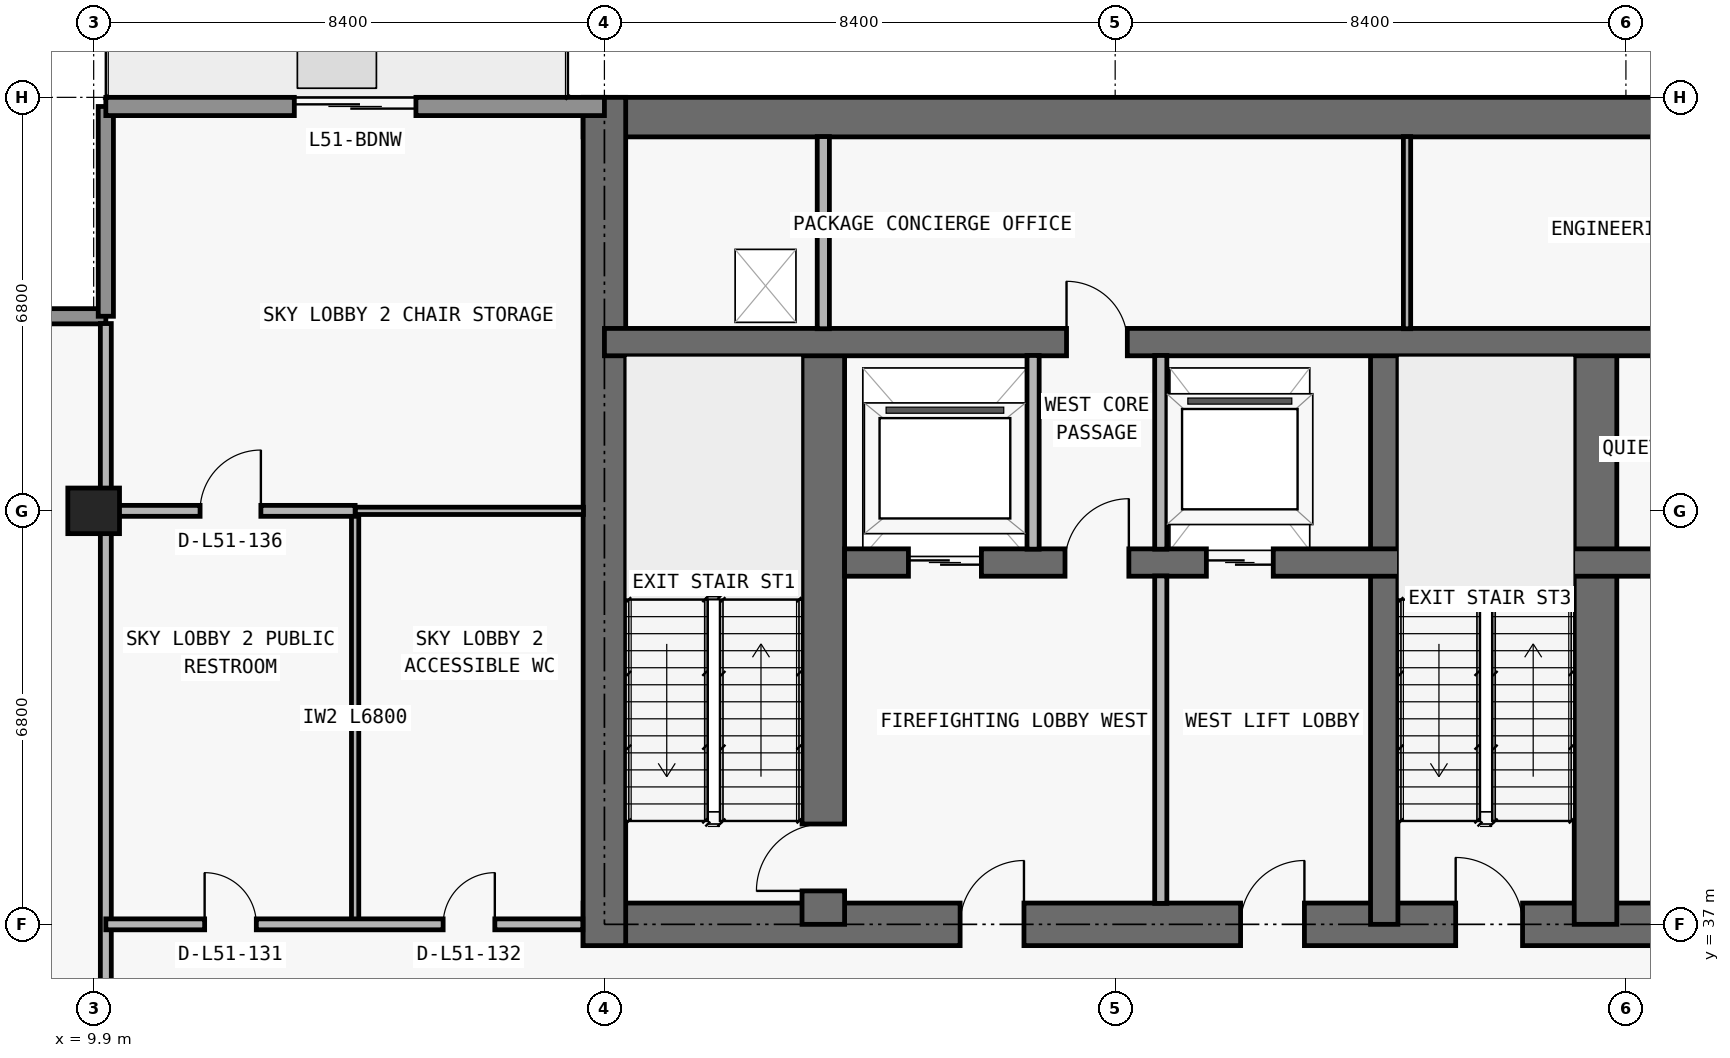
"""IFC4 building model, lengths in metres.
Left out: names, types, materials, properties, quantities, classifications, styles, units other than length and angle.
Written with IfcOpenShell. Run it as: python <this file> out.ifc"""

import sys

from ifc_helpers import new_model, si_unit, direction, frame, frame_2d, origin, origin_2d, place, context, subcontext, project, spatial, rectangle, extrude, element, fill, save


model = new_model("IFC4")
c1 = context("Model", 3, precision=1e-05, world=origin(), true_north=direction((0.0, 1.0)))
c2 = subcontext(c1, "Body", "Model", "MODEL_VIEW")
j1 = project(units=[si_unit("LENGTHUNIT", "METRE"), si_unit("PLANEANGLEUNIT", "RADIAN")], contexts=[c1])
p1 = place(None, origin())
s1 = spatial("IfcSite", under=j1, at=p1, CompositionType="ELEMENT")
p2 = place(p1, origin())
s2 = spatial("IfcBuilding", under=s1, at=p2, CompositionType="ELEMENT")
p3 = place(p2, frame((0.0, 0.0, 183.6)))
s3 = spatial("IfcBuildingStorey", under=s2, at=p3, CompositionType="ELEMENT", Elevation=183.6)
p4 = place(p3, frame((9.9, 43.8, 0.0), z_axis=(0.0, 0.0, 1.0), x_axis=(1.0, 0.0, 0.0)))
e1 = element("IfcColumn", 1, at=p4, inside=s3, PredefinedType="COLUMN", context=c2, shape_type="SweptSolid", body=[
    extrude(rectangle(XDim=0.85, YDim=0.75, at=origin_2d()), origin(), (0.0, 0.0, 1.0), 4.55),
])
p5 = place(p3, frame((17.95, 37.0, 0.0), z_axis=(0.0, 0.0, 1.0), x_axis=(1.0, 0.0, 0.0)))
e2 = element("IfcWall", 2, at=p5, inside=s3, PredefinedType="SHEAR", context=c2, shape_type="SweptSolid", body=[
    extrude(rectangle(XDim=41.9, YDim=0.7, at=frame_2d((20.95, 0.0))), origin(), (0.0, 0.0, 1.0), 4.55),
])
p6 = place(p5, frame((14.35, 0.0, 0.0)))
e3 = element("IfcOpeningElement", 3, at=p6, cuts=e2, PredefinedType="OPENING", context=c2, shape_type="SweptSolid", body=[
    extrude(rectangle(XDim=1.1, YDim=2.15, at=frame_2d((0.55, 1.075))), frame((0.0, 0.36, 0.0), z_axis=(0.0, -1.0, 0.0), x_axis=(1.0, 0.0, 0.0)), (0.0, 0.0, 1.0), 0.72),
])
p7 = place(p5, frame((6.2, 0.0, 0.0)))
e4 = element("IfcOpeningElement", 4, at=p7, cuts=e2, PredefinedType="OPENING", context=c2, shape_type="SweptSolid", body=[
    extrude(rectangle(XDim=1.05, YDim=2.15, at=frame_2d((0.525, 1.075))), frame((0.0, 0.36, 0.0), z_axis=(0.0, -1.0, 0.0), x_axis=(1.0, 0.0, 0.0)), (0.0, 0.0, 1.0), 0.72),
])
p8 = place(p5, frame((34.7, 0.0, 0.0)))
e5 = element("IfcOpeningElement", 5, at=p8, cuts=e2, PredefinedType="OPENING", context=c2, shape_type="SweptSolid", body=[
    extrude(rectangle(XDim=1.05, YDim=2.15, at=frame_2d((0.525, 1.075))), frame((0.0, 0.36, 0.0), z_axis=(0.0, -1.0, 0.0), x_axis=(1.0, 0.0, 0.0)), (0.0, 0.0, 1.0), 0.72),
])
p9 = place(p5, frame((10.812, 0.0, 0.0)))
e6 = element("IfcOpeningElement", 6, at=p9, cuts=e2, PredefinedType="OPENING", context=c2, shape_type="SweptSolid", body=[
    extrude(rectangle(XDim=1.05, YDim=2.15, at=frame_2d((0.525, 1.075))), frame((0.0, 0.36, 0.0), z_axis=(0.0, -1.0, 0.0), x_axis=(1.0, 0.0, 0.0)), (0.0, 0.0, 1.0), 0.72),
])
p10 = place(p5, frame((24.05, 0.0, 0.0)))
e7 = element("IfcOpeningElement", 7, at=p10, cuts=e2, PredefinedType="OPENING", context=c2, shape_type="SweptSolid", body=[
    extrude(rectangle(XDim=1.05, YDim=2.15, at=frame_2d((0.525, 1.075))), frame((0.0, 0.36, 0.0), z_axis=(0.0, -1.0, 0.0), x_axis=(1.0, 0.0, 0.0)), (0.0, 0.0, 1.0), 0.72),
])
p11 = place(p3, frame((17.95, 50.275, 0.0), z_axis=(0.0, 0.0, 1.0), x_axis=(1.0, 0.0, 0.0)))
e8 = element("IfcWall", 8, at=p11, inside=s3, PredefinedType="SHEAR", context=c2, shape_type="SweptSolid", body=[
    extrude(rectangle(XDim=41.9, YDim=0.65, at=frame_2d((20.95, 0.0))), origin(), (0.0, 0.0, 1.0), 4.55),
])
p12 = place(p3, frame((18.3, 36.65, 0.0), z_axis=(0.0, 0.0, 1.0), x_axis=(0.0, 1.0, 0.0)))
e9 = element("IfcWall", 9, at=p12, inside=s3, PredefinedType="SHEAR", context=c2, shape_type="SweptSolid", body=[
    extrude(rectangle(XDim=13.95, YDim=0.7, at=frame_2d((6.975, 0.0))), origin(), (0.0, 0.0, 1.0), 4.55),
])
p13 = place(p3, frame((21.9, 37.0, 0.0), z_axis=(0.0, 0.0, 1.0), x_axis=(0.0, 1.0, 0.0)))
e10 = element("IfcWall", 10, at=p13, inside=s3, PredefinedType="SHEAR", context=c2, shape_type="SweptSolid", body=[
    extrude(rectangle(XDim=9.575, YDim=0.7, at=frame_2d((4.788, 0.0))), origin(), (0.0, 0.0, 1.0), 4.55),
])
p14 = place(p13, frame((0.55, 0.0, 0.0)))
e11 = element("IfcOpeningElement", 11, at=p14, cuts=e10, PredefinedType="OPENING", context=c2, shape_type="SweptSolid", body=[
    extrude(rectangle(XDim=1.1, YDim=2.15, at=frame_2d((0.55, 1.075))), frame((0.0, 0.36, 0.0), z_axis=(0.0, -1.0, 0.0), x_axis=(1.0, 0.0, 0.0)), (0.0, 0.0, 1.0), 0.72),
])
p15 = place(p3, frame((31.125, 37.0, 0.0), z_axis=(0.0, 0.0, 1.0), x_axis=(0.0, 1.0, 0.0)))
e12 = element("IfcWall", 12, at=p15, inside=s3, PredefinedType="SHEAR", context=c2, shape_type="SweptSolid", body=[
    extrude(rectangle(XDim=9.575, YDim=0.45, at=frame_2d((4.788, 0.0))), origin(), (0.0, 0.0, 1.0), 4.55),
])
p16 = place(p3, frame((34.6, 37.0, 0.0), z_axis=(0.0, 0.0, 1.0), x_axis=(0.0, 1.0, 0.0)))
e13 = element("IfcWall", 13, at=p16, inside=s3, PredefinedType="SHEAR", context=c2, shape_type="SweptSolid", body=[
    extrude(rectangle(XDim=9.575, YDim=0.7, at=frame_2d((4.788, 0.0))), origin(), (0.0, 0.0, 1.0), 4.55),
])
p17 = place(p3, frame((22.25, 42.95, 0.0), z_axis=(0.0, 0.0, 1.0), x_axis=(1.0, 0.0, 0.0)))
e14 = element("IfcWall", 14, at=p17, inside=s3, PredefinedType="SHEAR", context=c2, shape_type="SweptSolid", body=[
    extrude(rectangle(XDim=33.3, YDim=0.45, at=frame_2d((16.65, 0.0))), origin(), (0.0, 0.0, 1.0), 4.55),
])
p18 = place(p17, frame((1.05, 0.0, 0.0)))
e15 = element("IfcOpeningElement", 15, at=p18, cuts=e14, PredefinedType="OPENING", context=c2, shape_type="SweptSolid", body=[
    extrude(rectangle(XDim=1.2, YDim=2.2, at=frame_2d((0.6, 1.1))), frame((0.0, 0.235, 0.0), z_axis=(0.0, -1.0, 0.0), x_axis=(1.0, 0.0, 0.0)), (0.0, 0.0, 1.0), 0.47),
])
p19 = place(p17, frame((31.05, 0.0, 0.0)))
e16 = element("IfcOpeningElement", 16, at=p19, cuts=e14, PredefinedType="OPENING", context=c2, shape_type="SweptSolid", body=[
    extrude(rectangle(XDim=1.2, YDim=2.2, at=frame_2d((0.6, 1.1))), frame((0.0, 0.235, 0.0), z_axis=(0.0, -1.0, 0.0), x_axis=(1.0, 0.0, 0.0)), (0.0, 0.0, 1.0), 0.47),
])
p20 = place(p17, frame((21.4, 0.0, 0.0)))
e17 = element("IfcOpeningElement", 17, at=p20, cuts=e14, PredefinedType="OPENING", context=c2, shape_type="SweptSolid", body=[
    extrude(rectangle(XDim=1.1, YDim=2.2, at=frame_2d((0.55, 1.1))), frame((0.0, 0.235, 0.0), z_axis=(0.0, -1.0, 0.0), x_axis=(1.0, 0.0, 0.0)), (0.0, 0.0, 1.0), 0.47),
])
p21 = place(p17, frame((24.0, 0.0, 0.0)))
e18 = element("IfcOpeningElement", 18, at=p21, cuts=e14, PredefinedType="OPENING", context=c2, shape_type="SweptSolid", body=[
    extrude(rectangle(XDim=1.1, YDim=2.2, at=frame_2d((0.55, 1.1))), frame((0.0, 0.235, 0.0), z_axis=(0.0, -1.0, 0.0), x_axis=(1.0, 0.0, 0.0)), (0.0, 0.0, 1.0), 0.47),
])
p22 = place(p17, frame((26.45, 0.0, 0.0)))
e19 = element("IfcOpeningElement", 19, at=p22, cuts=e14, PredefinedType="OPENING", context=c2, shape_type="SweptSolid", body=[
    extrude(rectangle(XDim=1.1, YDim=2.2, at=frame_2d((0.55, 1.1))), frame((0.0, 0.235, 0.0), z_axis=(0.0, -1.0, 0.0), x_axis=(1.0, 0.0, 0.0)), (0.0, 0.0, 1.0), 0.47),
])
p23 = place(p17, frame((5.95, 0.0, 0.0)))
e20 = element("IfcOpeningElement", 20, at=p23, cuts=e14, PredefinedType="OPENING", context=c2, shape_type="SweptSolid", body=[
    extrude(rectangle(XDim=1.1, YDim=2.2, at=frame_2d((0.55, 1.1))), frame((0.0, 0.235, 0.0), z_axis=(0.0, -1.0, 0.0), x_axis=(1.0, 0.0, 0.0)), (0.0, 0.0, 1.0), 0.47),
])
p24 = place(p17, frame((3.625, 0.0, 0.0)))
e21 = element("IfcOpeningElement", 21, at=p24, cuts=e14, PredefinedType="OPENING", context=c2, shape_type="SweptSolid", body=[
    extrude(rectangle(XDim=1.05, YDim=2.15, at=frame_2d((0.525, 1.075))), frame((0.0, 0.235, 0.0), z_axis=(0.0, -1.0, 0.0), x_axis=(1.0, 0.0, 0.0)), (0.0, 0.0, 1.0), 0.47),
])
p25 = place(p17, frame((28.675, 0.0, 0.0)))
e22 = element("IfcOpeningElement", 22, at=p25, cuts=e14, PredefinedType="OPENING", context=c2, shape_type="SweptSolid", body=[
    extrude(rectangle(XDim=1.05, YDim=2.15, at=frame_2d((0.525, 1.075))), frame((0.0, 0.235, 0.0), z_axis=(0.0, -1.0, 0.0), x_axis=(1.0, 0.0, 0.0)), (0.0, 0.0, 1.0), 0.47),
])
p26 = place(p17, frame((15.975, 0.0, 0.0)))
e23 = element("IfcOpeningElement", 23, at=p26, cuts=e14, PredefinedType="OPENING", context=c2, shape_type="SweptSolid", body=[
    extrude(rectangle(XDim=1.0, YDim=2.2, at=frame_2d((0.5, 1.1))), frame((0.0, 0.235, 0.0), z_axis=(0.0, -1.0, 0.0), x_axis=(1.0, 0.0, 0.0)), (0.0, 0.0, 1.0), 0.47),
])
p27 = place(p3, frame((18.3, 46.575, 0.0), z_axis=(0.0, 0.0, 1.0), x_axis=(1.0, 0.0, 0.0)))
e24 = element("IfcWall", 24, at=p27, inside=s3, PredefinedType="SHEAR", context=c2, shape_type="SweptSolid", body=[
    extrude(rectangle(XDim=41.2, YDim=0.45, at=frame_2d((20.6, 0.0))), origin(), (0.0, 0.0, 1.0), 4.55),
])
p28 = place(p27, frame((7.6, 0.0, 0.0)))
e25 = element("IfcOpeningElement", 25, at=p28, cuts=e24, PredefinedType="OPENING", context=c2, shape_type="SweptSolid", body=[
    extrude(rectangle(XDim=1.0, YDim=2.2, at=frame_2d((0.5, 1.1))), frame((0.0, 0.235, 0.0), z_axis=(0.0, -1.0, 0.0), x_axis=(1.0, 0.0, 0.0)), (0.0, 0.0, 1.0), 0.47),
])
p29 = place(p27, frame((32.625, 0.0, 0.0)))
e26 = element("IfcOpeningElement", 26, at=p29, cuts=e24, PredefinedType="OPENING", context=c2, shape_type="SweptSolid", body=[
    extrude(rectangle(XDim=1.05, YDim=2.15, at=frame_2d((0.525, 1.075))), frame((0.0, 0.235, 0.0), z_axis=(0.0, -1.0, 0.0), x_axis=(1.0, 0.0, 0.0)), (0.0, 0.0, 1.0), 0.47),
])
p30 = place(p3, frame((6.25, 47.0, 0.0), z_axis=(0.0, 0.0, 1.0), x_axis=(1.0, 0.0, 0.0)))
e27 = element("IfcWall", 27, at=p30, inside=s3, PredefinedType="ELEMENTEDWALL", context=c2, shape_type="SweptSolid", body=[
    extrude(rectangle(XDim=3.85, YDim=0.25, at=frame_2d((1.925, 0.0))), origin(), (0.0, 0.0, 1.0), 4.55),
])
p31 = place(p3, frame((10.1, 47.0, 0.0), z_axis=(0.0, 0.0, 1.0), x_axis=(0.0, 1.0, 0.0)))
e28 = element("IfcWall", 28, at=p31, inside=s3, PredefinedType="ELEMENTEDWALL", context=c2, shape_type="SweptSolid", body=[
    extrude(rectangle(XDim=3.45, YDim=0.25, at=frame_2d((1.725, 0.0))), origin(), (0.0, 0.0, 1.0), 4.55),
])
p32 = place(p3, frame((10.1, 50.45, 0.0), z_axis=(0.0, 0.0, 1.0), x_axis=(1.0, 0.0, 0.0)))
e29 = element("IfcWall", 29, at=p32, inside=s3, PredefinedType="STANDARD", context=c2, shape_type="SweptSolid", body=[
    extrude(rectangle(XDim=8.2, YDim=0.3, at=frame_2d((4.1, 0.0))), origin(), (0.0, 0.0, 1.0), 4.55),
])
p33 = place(p32, frame((3.1, 0.0, 0.0)))
e30 = element("IfcOpeningElement", 30, at=p33, cuts=e29, PredefinedType="OPENING", context=c2, shape_type="SweptSolid", body=[
    extrude(rectangle(XDim=2.0, YDim=2.3, at=frame_2d((1.0, 1.15))), frame((0.0, 0.16, 0.0), z_axis=(0.0, -1.0, 0.0), x_axis=(1.0, 0.0, 0.0)), (0.0, 0.0, 1.0), 0.32),
])
p34 = place(p3, frame((10.1, 11.285, 0.0), z_axis=(0.0, 0.0, 1.0), x_axis=(0.0, 1.0, 0.0)))
e31 = element("IfcWall", 31, at=p34, inside=s3, PredefinedType="PARTITIONING", context=c2, shape_type="SweptSolid", body=[
    extrude(rectangle(XDim=35.595, YDim=0.18, at=frame_2d((17.797, 0.0))), origin(), (0.0, 0.0, 1.0), 3.514),
])
p35 = place(p3, frame((14.2, 37.0, 0.0), z_axis=(0.0, 0.0, 1.0), x_axis=(0.0, 1.0, 0.0)))
e32 = element("IfcWall", 32, at=p35, inside=s3, PredefinedType="PARTITIONING", context=c2, shape_type="SweptSolid", body=[
    extrude(rectangle(XDim=6.8, YDim=0.12, at=frame_2d((3.4, 0.0))), origin(), (0.0, 0.0, 1.0), 3.923),
])
p36 = place(p3, frame((21.9, 46.795, 0.0), z_axis=(0.0, 0.0, 1.0), x_axis=(0.0, 1.0, 0.0)))
e33 = element("IfcWall", 33, at=p36, inside=s3, PredefinedType="PARTITIONING", context=c2, shape_type="SweptSolid", body=[
    extrude(rectangle(XDim=3.16, YDim=0.2, at=frame_2d((1.58, 0.0))), origin(), (0.0, 0.0, 1.0), 4.55),
])
p37 = place(p3, frame((25.35, 43.17, 0.0), z_axis=(0.0, 0.0, 1.0), x_axis=(0.0, 1.0, 0.0)))
e34 = element("IfcWall", 34, at=p37, inside=s3, PredefinedType="PARTITIONING", context=c2, shape_type="SweptSolid", body=[
    extrude(rectangle(XDim=3.185, YDim=0.2, at=frame_2d((1.593, 0.0))), origin(), (0.0, 0.0, 1.0), 4.55),
])
p38 = place(p3, frame((27.45, 37.345, 0.0), z_axis=(0.0, 0.0, 1.0), x_axis=(0.0, 1.0, 0.0)))
e35 = element("IfcWall", 35, at=p38, inside=s3, PredefinedType="PARTITIONING", context=c2, shape_type="SweptSolid", body=[
    extrude(rectangle(XDim=5.385, YDim=0.2, at=frame_2d((2.692, 0.0))), origin(), (0.0, 0.0, 1.0), 4.55),
])
p39 = place(p3, frame((27.45, 43.17, 0.0), z_axis=(0.0, 0.0, 1.0), x_axis=(0.0, 1.0, 0.0)))
e36 = element("IfcWall", 36, at=p39, inside=s3, PredefinedType="PARTITIONING", context=c2, shape_type="SweptSolid", body=[
    extrude(rectangle(XDim=3.185, YDim=0.2, at=frame_2d((1.593, 0.0))), origin(), (0.0, 0.0, 1.0), 4.55),
])
p40 = place(p3, frame((31.5, 46.795, 0.0), z_axis=(0.0, 0.0, 1.0), x_axis=(0.0, 1.0, 0.0)))
e37 = element("IfcWall", 37, at=p40, inside=s3, PredefinedType="PARTITIONING", context=c2, shape_type="SweptSolid", body=[
    extrude(rectangle(XDim=3.16, YDim=0.12, at=frame_2d((1.58, 0.0))), origin(), (0.0, 0.0, 1.0), 4.55),
])
p41 = place(p3, frame((10.1, 37.0, 0.0), z_axis=(0.0, 0.0, 1.0), x_axis=(1.0, 0.0, 0.0)))
e38 = element("IfcWall", 38, at=p41, inside=s3, PredefinedType="PARTITIONING", context=c2, shape_type="SweptSolid", body=[
    extrude(rectangle(XDim=7.845, YDim=0.18, at=frame_2d((3.922, 0.0))), origin(), (0.0, 0.0, 1.0), 4.55),
])
p42 = place(p41, frame((1.625, 0.0, 0.0)))
e39 = element("IfcOpeningElement", 39, at=p42, cuts=e38, PredefinedType="OPENING", context=c2, shape_type="SweptSolid", body=[
    extrude(rectangle(XDim=0.85, YDim=2.1, at=frame_2d((0.425, 1.05))), frame((0.0, 0.1, 0.0), z_axis=(0.0, -1.0, 0.0), x_axis=(1.0, 0.0, 0.0)), (0.0, 0.0, 1.0), 0.2),
])
p43 = place(p41, frame((5.548, 0.0, 0.0)))
e40 = element("IfcOpeningElement", 40, at=p43, cuts=e38, PredefinedType="OPENING", context=c2, shape_type="SweptSolid", body=[
    extrude(rectangle(XDim=0.85, YDim=2.1, at=frame_2d((0.425, 1.05))), frame((0.0, 0.1, 0.0), z_axis=(0.0, -1.0, 0.0), x_axis=(1.0, 0.0, 0.0)), (0.0, 0.0, 1.0), 0.2),
])
p44 = place(p3, frame((10.1, 43.8, 0.0), z_axis=(0.0, 0.0, 1.0), x_axis=(1.0, 0.0, 0.0)))
e41 = element("IfcWall", 41, at=p44, inside=s3, PredefinedType="PARTITIONING", context=c2, shape_type="SweptSolid", body=[
    extrude(rectangle(XDim=4.1, YDim=0.18, at=frame_2d((2.05, 0.0))), origin(), (0.0, 0.0, 1.0), 3.839),
])
p45 = place(p44, frame((1.55, 0.0, 0.0)))
e42 = element("IfcOpeningElement", 42, at=p45, cuts=e41, PredefinedType="OPENING", context=c2, shape_type="SweptSolid", body=[
    extrude(rectangle(XDim=1.0, YDim=2.2, at=frame_2d((0.5, 1.1))), frame((0.0, 0.1, 0.0), z_axis=(0.0, -1.0, 0.0), x_axis=(1.0, 0.0, 0.0)), (0.0, 0.0, 1.0), 0.2),
])
p46 = place(p3, frame((14.205, 43.8, 0.0), z_axis=(0.0, 0.0, 1.0), x_axis=(1.0, 0.0, 0.0)))
e43 = element("IfcWall", 43, at=p46, inside=s3, PredefinedType="PARTITIONING", context=c2, shape_type="SweptSolid", body=[
    extrude(rectangle(XDim=3.75, YDim=0.12, at=frame_2d((1.875, 0.0))), origin(), (0.0, 0.0, 1.0), 3.839),
])
p47 = place(p33, origin())
e44 = element("IfcDoor", 44, at=p47, inside=s3, OperationType="DOUBLE_DOOR_SLIDING", PredefinedType="DOOR", context=c2, shape_type="SweptSolid", body=[
    extrude(rectangle(XDim=2.0, YDim=2.3, at=frame_2d((1.0, 1.15))), frame((0.0, 0.025, 0.0), z_axis=(0.0, -1.0, 0.0), x_axis=(1.0, 0.0, 0.0)), (0.0, 0.0, 1.0), 0.05),
])
fill(e30, e44)
p48 = place(p18, origin())
e45 = element("IfcDoor", 45, at=p48, inside=s3, OperationType="DOUBLE_DOOR_SLIDING", PredefinedType="DOOR", context=c2, shape_type="SweptSolid", body=[
    extrude(rectangle(XDim=1.2, YDim=2.2, at=frame_2d((0.6, 1.1))), frame((0.0, 0.025, 0.0), z_axis=(0.0, -1.0, 0.0), x_axis=(1.0, 0.0, 0.0)), (0.0, 0.0, 1.0), 0.05),
])
fill(e15, e45)
p49 = place(p23, origin())
e46 = element("IfcDoor", 46, at=p49, inside=s3, OperationType="DOUBLE_DOOR_SLIDING", PredefinedType="DOOR", context=c2, shape_type="SweptSolid", body=[
    extrude(rectangle(XDim=1.1, YDim=2.2, at=frame_2d((0.55, 1.1))), frame((0.0, 0.025, 0.0), z_axis=(0.0, -1.0, 0.0), x_axis=(1.0, 0.0, 0.0)), (0.0, 0.0, 1.0), 0.05),
])
fill(e20, e46)
p50 = place(p6, origin())
e47 = element("IfcDoor", 47, at=p50, inside=s3, OperationType="SINGLE_SWING_LEFT", PredefinedType="DOOR", context=c2, shape_type="SweptSolid", body=[
    extrude(rectangle(XDim=1.1, YDim=2.15, at=frame_2d((0.55, 1.075))), frame((0.0, 0.025, 0.0), z_axis=(0.0, -1.0, 0.0), x_axis=(1.0, 0.0, 0.0)), (0.0, 0.0, 1.0), 0.05),
])
fill(e3, e47)
p51 = place(p7, origin())
e48 = element("IfcDoor", 48, at=p51, inside=s3, OperationType="SINGLE_SWING_RIGHT", PredefinedType="DOOR", context=c2, shape_type="SweptSolid", body=[
    extrude(rectangle(XDim=1.05, YDim=2.15, at=frame_2d((0.525, 1.075))), frame((0.0, 0.025, 0.0), z_axis=(0.0, -1.0, 0.0), x_axis=(1.0, 0.0, 0.0)), (0.0, 0.0, 1.0), 0.05),
])
fill(e4, e48)
p52 = place(p14, origin())
e49 = element("IfcDoor", 49, at=p52, inside=s3, OperationType="SINGLE_SWING_LEFT", PredefinedType="DOOR", context=c2, shape_type="SweptSolid", body=[
    extrude(rectangle(XDim=1.1, YDim=2.15, at=frame_2d((0.55, 1.075))), frame((0.0, 0.025, 0.0), z_axis=(0.0, -1.0, 0.0), x_axis=(1.0, 0.0, 0.0)), (0.0, 0.0, 1.0), 0.05),
])
fill(e11, e49)
p53 = place(p24, origin())
e50 = element("IfcDoor", 50, at=p53, inside=s3, OperationType="SINGLE_SWING_RIGHT", PredefinedType="DOOR", context=c2, shape_type="SweptSolid", body=[
    extrude(rectangle(XDim=1.05, YDim=2.15, at=frame_2d((0.525, 1.075))), frame((0.0, 0.025, 0.0), z_axis=(0.0, -1.0, 0.0), x_axis=(1.0, 0.0, 0.0)), (0.0, 0.0, 1.0), 0.05),
])
fill(e21, e50)
p54 = place(p9, origin())
e51 = element("IfcDoor", 51, at=p54, inside=s3, OperationType="SINGLE_SWING_RIGHT", PredefinedType="DOOR", context=c2, shape_type="SweptSolid", body=[
    extrude(rectangle(XDim=1.05, YDim=2.15, at=frame_2d((0.525, 1.075))), frame((0.0, 0.025, 0.0), z_axis=(0.0, -1.0, 0.0), x_axis=(1.0, 0.0, 0.0)), (0.0, 0.0, 1.0), 0.05),
])
fill(e6, e51)
p55 = place(p28, origin())
e52 = element("IfcDoor", 52, at=p55, inside=s3, OperationType="SINGLE_SWING_LEFT", PredefinedType="DOOR", context=c2, shape_type="SweptSolid", body=[
    extrude(rectangle(XDim=1.0, YDim=2.2, at=frame_2d((0.5, 1.1))), frame((0.0, 0.025, 0.0), z_axis=(0.0, -1.0, 0.0), x_axis=(1.0, 0.0, 0.0)), (0.0, 0.0, 1.0), 0.05),
])
fill(e25, e52)
p56 = place(p42, origin())
e53 = element("IfcDoor", 53, at=p56, inside=s3, OperationType="SINGLE_SWING_LEFT", PredefinedType="DOOR", context=c2, shape_type="SweptSolid", body=[
    extrude(rectangle(XDim=0.85, YDim=2.1, at=frame_2d((0.425, 1.05))), frame((0.0, 0.025, 0.0), z_axis=(0.0, -1.0, 0.0), x_axis=(1.0, 0.0, 0.0)), (0.0, 0.0, 1.0), 0.05),
])
fill(e39, e53)
p57 = place(p43, origin())
e54 = element("IfcDoor", 54, at=p57, inside=s3, OperationType="SINGLE_SWING_RIGHT", PredefinedType="DOOR", context=c2, shape_type="SweptSolid", body=[
    extrude(rectangle(XDim=0.85, YDim=2.1, at=frame_2d((0.425, 1.05))), frame((0.0, 0.025, 0.0), z_axis=(0.0, -1.0, 0.0), x_axis=(1.0, 0.0, 0.0)), (0.0, 0.0, 1.0), 0.05),
])
fill(e40, e54)
p58 = place(p45, origin())
e55 = element("IfcDoor", 55, at=p58, inside=s3, OperationType="SINGLE_SWING_RIGHT", PredefinedType="DOOR", context=c2, shape_type="SweptSolid", body=[
    extrude(rectangle(XDim=1.0, YDim=2.2, at=frame_2d((0.5, 1.1))), frame((0.0, 0.025, 0.0), z_axis=(0.0, -1.0, 0.0), x_axis=(1.0, 0.0, 0.0)), (0.0, 0.0, 1.0), 0.05),
])
fill(e42, e55)
save(model, sys.argv[1])
